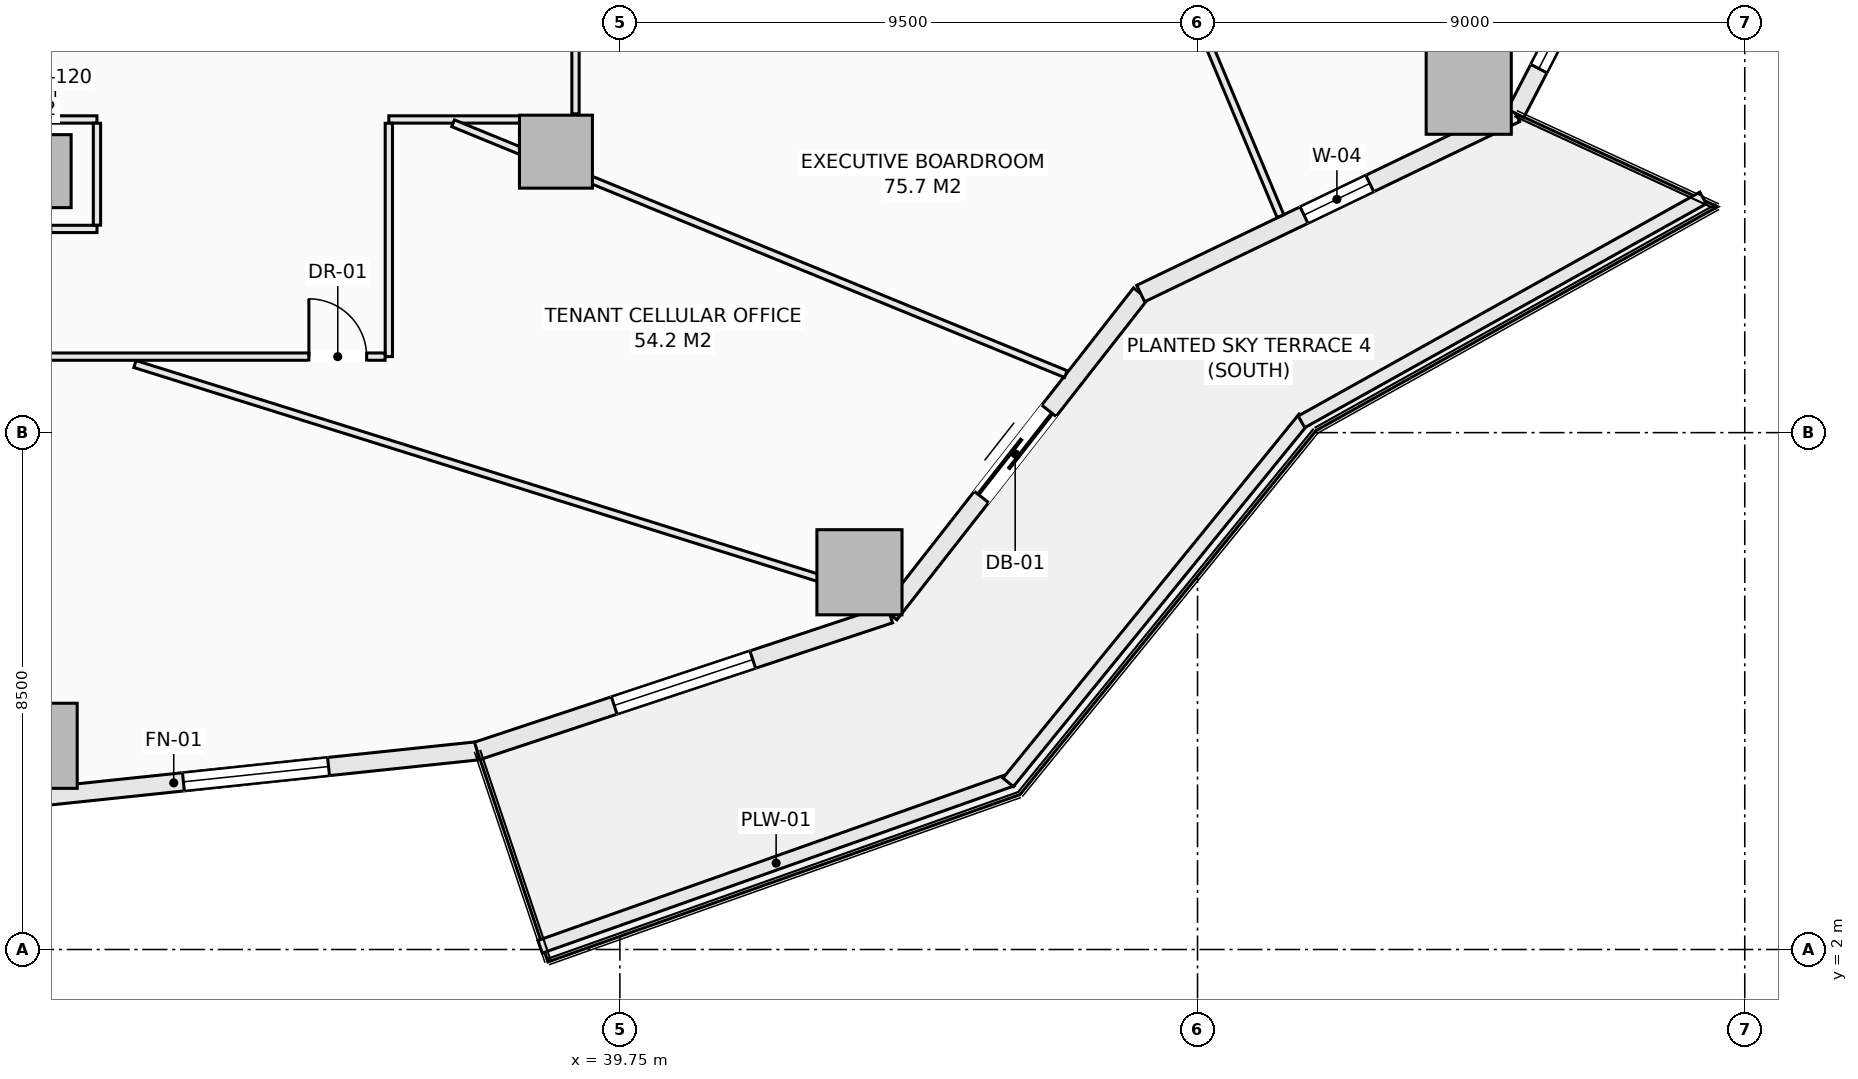
"""IFC4 building model, lengths in metres.
Left out: names, types, materials, properties, quantities, classifications, styles, units other than length and angle.
Written with IfcOpenShell. Run it as: python <this file> out.ifc"""

import sys

from ifc_helpers import new_model, si_unit, direction, frame, frame_2d, origin, origin_2d, place, context, subcontext, project, spatial, rectangle, extrude, element, fill, save


model = new_model("IFC4")
c1 = context("Model", 3, precision=1e-05, world=origin(), true_north=direction((0.0, 1.0)))
c2 = subcontext(c1, "Body", "Model", "MODEL_VIEW")
j1 = project(units=[si_unit("LENGTHUNIT", "METRE"), si_unit("PLANEANGLEUNIT", "RADIAN")], contexts=[c1])
p1 = place(None, origin())
s1 = spatial("IfcSite", under=j1, at=p1, CompositionType="ELEMENT")
p2 = place(p1, origin())
s2 = spatial("IfcBuilding", under=s1, at=p2, CompositionType="ELEMENT")
p3 = place(p2, frame((0.0, 0.0, 30.35)))
s3 = spatial("IfcBuildingStorey", under=s2, at=p3, CompositionType="ELEMENT", Elevation=30.35)
for number, where, z_axis, x_axis in (
    (1, (30.125, 5.35, -0.28), (0.0, 0.0, 1.0), (1.0, 0.0, 0.0)),
    (2, (43.69, 8.204, -0.28), (0.0, 0.0, 1.0), (1.0, 0.0, 0.0)),
    (3, (53.71, 16.106, -0.28), (0.0, 0.0, 1.0), (1.0, 0.0, 0.0)),
):
    element("IfcColumn", number, at=place(p3, frame(where, z_axis=z_axis, x_axis=x_axis)), inside=s3, PredefinedType="COLUMN", context=c2, shape_type="SweptSolid", body=[
        extrude(rectangle(XDim=1.4, YDim=1.4, at=origin_2d()), origin(), (0.0, 0.0, 1.0), 3.85),
    ])
for number, where, z_axis, x_axis in (
    (4, (30.125, 14.8, -0.28), (0.0, 0.0, 1.0), (1.0, 0.0, 0.0)),
    (5, (38.698, 15.121, -0.28), (0.0, 0.0, 1.0), (1.0, 0.0, 0.0)),
):
    element("IfcColumn", number, at=place(p3, frame(where, z_axis=z_axis, x_axis=x_axis)), inside=s3, PredefinedType="COLUMN", context=c2, shape_type="SweptSolid", body=[
        extrude(rectangle(XDim=1.2, YDim=1.2, at=origin_2d()), origin(), (0.0, 0.0, 1.0), 3.85),
    ])
p4 = place(p3, frame((30.125, 4.5, 0.0), z_axis=(0.0, 0.0, 1.0), x_axis=(0.994500334317, 0.104733399844, 0.0)))
e6 = element("IfcWall", 6, at=p4, inside=s3, PredefinedType="SOLIDWALL", context=c2, shape_type="SweptSolid", body=[
    extrude(rectangle(XDim=7.32, YDim=0.3, at=frame_2d((3.66, 0.0))), origin(), (0.0, 0.0, 1.0), 3.093),
])
p5 = place(p4, frame((2.46, 0.0, 0.85)))
e7 = element("IfcOpeningElement", 7, at=p5, cuts=e6, PredefinedType="OPENING", context=c2, shape_type="SweptSolid", body=[
    extrude(rectangle(XDim=2.4, YDim=1.9, at=frame_2d((1.2, 0.95))), frame((0.0, 0.16, 0.0), z_axis=(0.0, -1.0, 0.0), x_axis=(1.0, 0.0, 0.0)), (0.0, 0.0, 1.0), 0.32),
])
p6 = place(p3, frame((37.404, 5.267, 0.0), z_axis=(0.0, 0.0, 1.0), x_axis=(0.949238715533, 0.31455661006, 0.0)))
e8 = element("IfcWall", 8, at=p6, inside=s3, PredefinedType="SOLIDWALL", context=c2, shape_type="SweptSolid", body=[
    extrude(rectangle(XDim=7.146, YDim=0.3, at=frame_2d((3.573, 0.0))), origin(), (0.0, 0.0, 1.0), 3.093),
])
p7 = place(p6, frame((2.373, 0.0, 0.85)))
e9 = element("IfcOpeningElement", 9, at=p7, cuts=e8, PredefinedType="OPENING", context=c2, shape_type="SweptSolid", body=[
    extrude(rectangle(XDim=2.4, YDim=1.9, at=frame_2d((1.2, 0.95))), frame((0.0, 0.16, 0.0), z_axis=(0.0, -1.0, 0.0), x_axis=(1.0, 0.0, 0.0)), (0.0, 0.0, 1.0), 0.32),
])
p8 = place(p3, frame((44.188, 7.514, 0.0), z_axis=(0.0, 0.0, 1.0), x_axis=(0.616421309777, 0.787416515482, 0.0)))
e10 = element("IfcWall", 10, at=p8, inside=s3, PredefinedType="SOLIDWALL", context=c2, shape_type="SweptSolid", body=[
    extrude(rectangle(XDim=6.696, YDim=0.3, at=frame_2d((3.348, 0.0))), origin(), (0.0, 0.0, 1.0), 3.093),
])
p9 = place(p8, frame((2.448, 0.0, 0.0)))
e11 = element("IfcOpeningElement", 11, at=p9, cuts=e10, PredefinedType="OPENING", context=c2, shape_type="SweptSolid", body=[
    extrude(rectangle(XDim=1.8, YDim=2.25, at=frame_2d((0.9, 1.125))), frame((0.0, 0.16, 0.0), z_axis=(0.0, -1.0, 0.0), x_axis=(1.0, 0.0, 0.0)), (0.0, 0.0, 1.0), 0.32),
])
p10 = place(p3, frame((48.315, 12.787, 0.0), z_axis=(0.0, 0.0, 1.0), x_axis=(0.901360393999, 0.433069786673, 0.0)))
e12 = element("IfcWall", 12, at=p10, inside=s3, PredefinedType="SOLIDWALL", context=c2, shape_type="SweptSolid", body=[
    extrude(rectangle(XDim=6.842, YDim=0.3, at=frame_2d((3.421, 0.0))), origin(), (0.0, 0.0, 1.0), 3.093),
])
p11 = place(p10, frame((2.98, 0.0, 0.72)))
e13 = element("IfcOpeningElement", 13, at=p11, cuts=e12, PredefinedType="OPENING", context=c2, shape_type="SweptSolid", body=[
    extrude(rectangle(XDim=1.2, YDim=1.65, at=frame_2d((0.6, 0.825))), frame((0.0, 0.16, 0.0), z_axis=(0.0, -1.0, 0.0), x_axis=(1.0, 0.0, 0.0)), (0.0, 0.0, 1.0), 0.32),
])
p12 = place(p3, frame((54.482, 15.75, 0.0), z_axis=(0.0, 0.0, 1.0), x_axis=(0.459809804413, 0.88801742312, 0.0)))
e14 = element("IfcWall", 14, at=p12, inside=s3, PredefinedType="SOLIDWALL", context=c2, shape_type="SweptSolid", body=[
    extrude(rectangle(XDim=6.111, YDim=0.3, at=frame_2d((3.055, 0.0))), origin(), (0.0, 0.0, 1.0), 3.093),
])
p13 = place(p12, frame((0.829, 0.0, 0.85)))
e15 = element("IfcOpeningElement", 15, at=p13, cuts=e14, PredefinedType="OPENING", context=c2, shape_type="SweptSolid", body=[
    extrude(rectangle(XDim=0.9, YDim=1.9, at=frame_2d((0.45, 0.95))), frame((0.0, 0.16, 0.0), z_axis=(0.0, -1.0, 0.0), x_axis=(1.0, 0.0, 0.0)), (0.0, 0.0, 1.0), 0.32),
])
p14 = place(p12, frame((2.022, 0.0, 0.85)))
e16 = element("IfcOpeningElement", 16, at=p14, cuts=e14, PredefinedType="OPENING", context=c2, shape_type="SweptSolid", body=[
    extrude(rectangle(XDim=0.9, YDim=1.9, at=frame_2d((0.45, 0.95))), frame((0.0, 0.16, 0.0), z_axis=(0.0, -1.0, 0.0), x_axis=(1.0, 0.0, 0.0)), (0.0, 0.0, 1.0), 0.32),
])
p15 = place(p3, frame((38.438, 2.045, 0.0), z_axis=(0.0, 0.0, 1.0), x_axis=(0.942581348797, 0.333976647237, 0.0)))
e17 = element("IfcWall", 17, at=p15, inside=s3, PredefinedType="PARAPET", context=c2, shape_type="SweptSolid", body=[
    extrude(rectangle(XDim=8.236, YDim=0.22, at=frame_2d((4.118, 0.0))), origin(), (0.0, 0.0, 1.0), 0.52),
])
p16 = place(p3, frame((46.136, 4.749, 0.0), z_axis=(0.0, 0.0, 1.0), x_axis=(0.630997450658, 0.775784903993, 0.0)))
e18 = element("IfcWall", 18, at=p16, inside=s3, PredefinedType="PARAPET", context=c2, shape_type="SweptSolid", body=[
    extrude(rectangle(XDim=7.718, YDim=0.22, at=frame_2d((3.859, 0.0))), origin(), (0.0, 0.0, 1.0), 0.52),
])
p17 = place(p3, frame((50.959, 10.678, 0.0), z_axis=(0.0, 0.0, 1.0), x_axis=(0.873500119739, 0.48682393205, 0.0)))
e19 = element("IfcWall", 19, at=p17, inside=s3, PredefinedType="PARAPET", context=c2, shape_type="SweptSolid", body=[
    extrude(rectangle(XDim=7.562, YDim=0.22, at=frame_2d((3.781, 0.0))), origin(), (0.0, 0.0, 1.0), 0.52),
])
p18 = place(p3, frame((29.78, 15.65, 0.0), z_axis=(0.0, 0.0, 1.0), x_axis=(1.0, 0.0, 0.0)))
e20 = element("IfcWall", 20, at=p18, inside=s3, PredefinedType="PARTITIONING", context=c2, shape_type="SweptSolid", body=[
    extrude(rectangle(XDim=1.37, YDim=0.12, at=frame_2d((0.685, 0.0))), origin(), (0.0, 0.0, 1.0), 3.57),
])
p19 = place(p3, frame((35.95, 15.65, 0.0), z_axis=(0.0, 0.0, 1.0), x_axis=(1.0, 0.0, 0.0)))
e21 = element("IfcWall", 21, at=p19, inside=s3, PredefinedType="PARTITIONING", context=c2, shape_type="SweptSolid", body=[
    extrude(rectangle(XDim=2.291, YDim=0.12, at=frame_2d((1.146, 0.0))), origin(), (0.0, 0.0, 1.0), 3.57),
])
p20 = place(p3, frame((35.95, 11.75, 0.0), z_axis=(0.0, 0.0, 1.0), x_axis=(0.0, 1.0, 0.0)))
e22 = element("IfcWall", 22, at=p20, inside=s3, PredefinedType="PARTITIONING", context=c2, shape_type="SweptSolid", body=[
    extrude(rectangle(XDim=3.838, YDim=0.12, at=frame_2d((1.919, 0.0))), origin(), (0.0, 0.0, 1.0), 3.57),
])
p21 = place(p3, frame((27.227, 11.75, 0.0), z_axis=(0.0, 0.0, 1.0), x_axis=(1.0, 0.0, 0.0)))
e23 = element("IfcWall", 23, at=p21, inside=s3, PredefinedType="PARTITIONING", context=c2, shape_type="SweptSolid", body=[
    extrude(rectangle(XDim=8.661, YDim=0.12, at=frame_2d((4.331, 0.0))), origin(), (0.0, 0.0, 1.0), 3.57),
])
p22 = place(p21, frame((2.091, 0.0, 0.0)))
e24 = element("IfcOpeningElement", 24, at=p22, cuts=e23, PredefinedType="OPENING", context=c2, shape_type="SweptSolid", body=[
    extrude(rectangle(XDim=0.95, YDim=2.1, at=frame_2d((0.475, 1.05))), frame((0.0, 0.07, 0.0), z_axis=(0.0, -1.0, 0.0), x_axis=(1.0, 0.0, 0.0)), (0.0, 0.0, 1.0), 0.14),
])
p23 = place(p21, frame((7.408, 0.0, 0.0)))
e25 = element("IfcOpeningElement", 25, at=p23, cuts=e23, PredefinedType="OPENING", context=c2, shape_type="SweptSolid", body=[
    extrude(rectangle(XDim=0.95, YDim=2.1, at=frame_2d((0.475, 1.05))), frame((0.0, 0.07, 0.0), z_axis=(0.0, -1.0, 0.0), x_axis=(1.0, 0.0, 0.0)), (0.0, 0.0, 1.0), 0.14),
])
p24 = place(p3, frame((39.02, 15.742, 0.0), z_axis=(0.0, 0.0, 1.0), x_axis=(0.0, 1.0, 0.0)))
e26 = element("IfcWall", 26, at=p24, inside=s3, PredefinedType="PARTITIONING", context=c2, shape_type="SweptSolid", body=[
    extrude(rectangle(XDim=1.268, YDim=0.12, at=frame_2d((0.634, 0.0))), origin(), (0.0, 0.0, 1.0), 2.934),
])
p25 = place(p3, frame((30.391, 13.85, 0.0), z_axis=(0.0, 0.0, 1.0), x_axis=(1.0, 0.0, 0.0)))
e27 = element("IfcWall", 27, at=p25, inside=s3, PredefinedType="PARTITIONING", context=c2, shape_type="SweptSolid", body=[
    extrude(rectangle(XDim=0.759, YDim=0.12, at=frame_2d((0.379, 0.0))), origin(), (0.0, 0.0, 1.0), 3.57),
])
p26 = place(p3, frame((31.15, 13.912, 0.0), z_axis=(0.0, 0.0, 1.0), x_axis=(0.0, 1.0, 0.0)))
e28 = element("IfcWall", 28, at=p26, inside=s3, PredefinedType="PARTITIONING", context=c2, shape_type="SweptSolid", body=[
    extrude(rectangle(XDim=1.676, YDim=0.12, at=frame_2d((0.838, 0.0))), origin(), (0.0, 0.0, 1.0), 3.57),
])
p27 = place(p3, frame((37.006, 15.588, 0.0), z_axis=(0.0, 0.0, 1.0), x_axis=(0.925475521817, -0.378807416134, 0.0)))
e29 = element("IfcWall", 29, at=p27, inside=s3, PredefinedType="PARTITIONING", context=c2, shape_type="SweptSolid", body=[
    extrude(rectangle(XDim=10.891, YDim=0.12, at=frame_2d((5.445, 0.0))), origin(), (0.0, 0.0, 1.0), 2.934),
])
p28 = place(p3, frame((31.774, 11.628, 0.0), z_axis=(0.0, 0.0, 1.0), x_axis=(0.954372945157, -0.298617282742, 0.0)))
e30 = element("IfcWall", 30, at=p28, inside=s3, PredefinedType="PARTITIONING", context=c2, shape_type="SweptSolid", body=[
    extrude(rectangle(XDim=12.995, YDim=0.12, at=frame_2d((6.498, 0.0))), origin(), (0.0, 0.0, 1.0), 3.093),
])
p29 = place(p3, frame((48.862, 18.243, 0.0), z_axis=(0.0, 0.0, 1.0), x_axis=(0.386350060349, -0.922352227117, 0.0)))
e31 = element("IfcWall", 31, at=p29, inside=s3, PredefinedType="PARTITIONING", context=c2, shape_type="SweptSolid", body=[
    extrude(rectangle(XDim=4.535, YDim=0.12, at=frame_2d((2.268, 0.0))), origin(), (0.0, 0.0, 1.0), 3.57),
])
p30 = place(p5, origin())
e32 = element("IfcWindow", 32, at=p30, inside=s3, PartitioningType="SINGLE_PANEL", PredefinedType="WINDOW", context=c2, shape_type="SweptSolid", body=[
    extrude(rectangle(XDim=2.4, YDim=1.9, at=frame_2d((1.2, 0.95))), frame((0.0, 0.03, 0.0), z_axis=(0.0, -1.0, 0.0), x_axis=(1.0, 0.0, 0.0)), (0.0, 0.0, 1.0), 0.06),
])
fill(e7, e32)
p31 = place(p7, origin())
e33 = element("IfcWindow", 33, at=p31, inside=s3, PartitioningType="SINGLE_PANEL", PredefinedType="WINDOW", context=c2, shape_type="SweptSolid", body=[
    extrude(rectangle(XDim=2.4, YDim=1.9, at=frame_2d((1.2, 0.95))), frame((0.0, 0.03, 0.0), z_axis=(0.0, -1.0, 0.0), x_axis=(1.0, 0.0, 0.0)), (0.0, 0.0, 1.0), 0.06),
])
fill(e9, e33)
p32 = place(p9, frame((1.8, 0.0, 0.0), z_axis=(0.0, 0.0, 1.0), x_axis=(-1.0, 0.0, 0.0)))
e34 = element("IfcDoor", 34, at=p32, inside=s3, OperationType="SLIDING_TO_LEFT", PredefinedType="DOOR", context=c2, shape_type="SweptSolid", body=[
    extrude(rectangle(XDim=1.8, YDim=2.25, at=frame_2d((0.9, 1.125))), frame((0.0, 0.025, 0.0), z_axis=(0.0, -1.0, 0.0), x_axis=(1.0, 0.0, 0.0)), (0.0, 0.0, 1.0), 0.05),
])
fill(e11, e34)
p33 = place(p11, origin())
e35 = element("IfcWindow", 35, at=p33, inside=s3, PartitioningType="SINGLE_PANEL", PredefinedType="WINDOW", context=c2, shape_type="SweptSolid", body=[
    extrude(rectangle(XDim=1.2, YDim=1.65, at=frame_2d((0.6, 0.825))), frame((0.0, 0.03, 0.0), z_axis=(0.0, -1.0, 0.0), x_axis=(1.0, 0.0, 0.0)), (0.0, 0.0, 1.0), 0.06),
])
fill(e13, e35)
p34 = place(p13, origin())
e36 = element("IfcWindow", 36, at=p34, inside=s3, PartitioningType="SINGLE_PANEL", PredefinedType="WINDOW", context=c2, shape_type="SweptSolid", body=[
    extrude(rectangle(XDim=0.9, YDim=1.9, at=frame_2d((0.45, 0.95))), frame((0.0, 0.03, 0.0), z_axis=(0.0, -1.0, 0.0), x_axis=(1.0, 0.0, 0.0)), (0.0, 0.0, 1.0), 0.06),
])
fill(e15, e36)
p35 = place(p23, origin())
e37 = element("IfcDoor", 37, at=p35, inside=s3, OperationType="SINGLE_SWING_LEFT", PredefinedType="DOOR", context=c2, shape_type="SweptSolid", body=[
    extrude(rectangle(XDim=0.95, YDim=2.1, at=frame_2d((0.475, 1.05))), frame((0.0, 0.025, 0.0), z_axis=(0.0, -1.0, 0.0), x_axis=(1.0, 0.0, 0.0)), (0.0, 0.0, 1.0), 0.05),
])
fill(e25, e37)
save(model, sys.argv[1])
